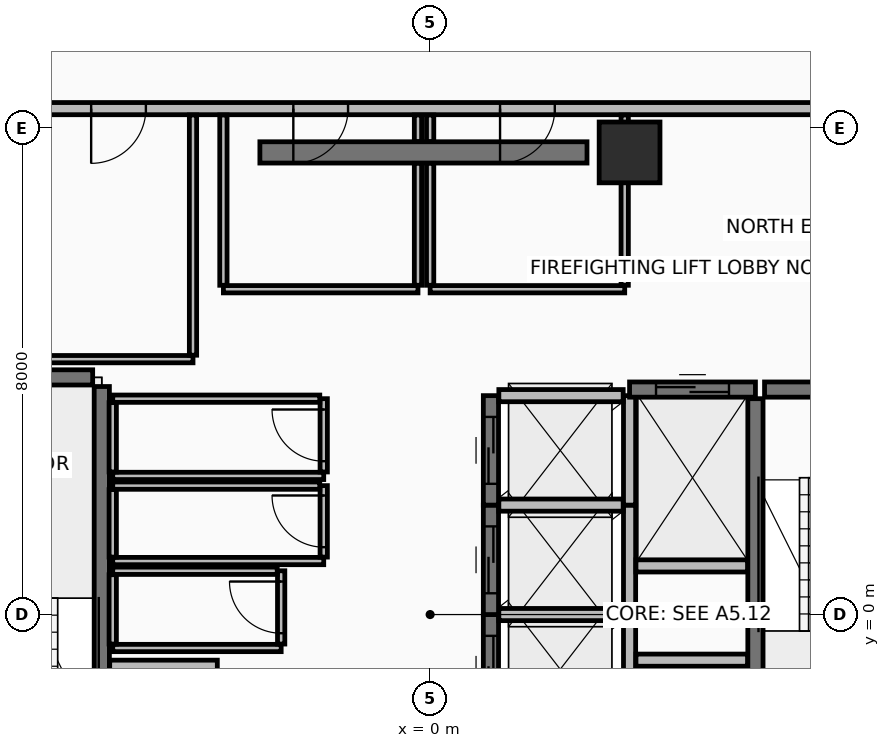
"""IFC4 building model, lengths in metres.
Left out: names, types, materials, properties, quantities, classifications, styles, units other than length and angle.
Written with IfcOpenShell. Run it as: python <this file> out.ifc"""

import sys

from ifc_helpers import new_model, si_unit, direction, frame, frame_2d, origin, origin_2d, place, context, subcontext, project, spatial, rectangle, extrude, element, fill, save


model = new_model("IFC4")
c1 = context("Model", 3, precision=1e-05, world=origin(), true_north=direction((0.0, 1.0)))
c2 = subcontext(c1, "Body", "Model", "MODEL_VIEW")
j1 = project(units=[si_unit("LENGTHUNIT", "METRE"), si_unit("PLANEANGLEUNIT", "RADIAN")], contexts=[c1])
p1 = place(None, origin())
s1 = spatial("IfcSite", under=j1, at=p1, CompositionType="ELEMENT")
p2 = place(p1, origin())
s2 = spatial("IfcBuilding", under=s1, at=p2, CompositionType="ELEMENT")
p3 = place(p2, frame((0.0, 0.0, 264.2)))
s3 = spatial("IfcBuildingStorey", under=s2, at=p3, CompositionType="ELEMENT", Elevation=264.2)
p4 = place(p3, frame((3.28, 7.6, 0.0), z_axis=(0.0, 0.0, 1.0), x_axis=(1.0, 0.0, 0.0)))
e1 = element("IfcColumn", 1, at=p4, inside=s3, PredefinedType="COLUMN", context=c2, shape_type="SweptSolid", body=[
    extrude(rectangle(XDim=1.0, YDim=1.0, at=origin_2d()), origin(), (0.0, 0.0, 1.0), 3.6),
])
p5 = place(p3, frame((-2.8, 7.6, 0.0), z_axis=(0.0, 0.0, 1.0), x_axis=(1.0, 0.0, 0.0)))
e2 = element("IfcWall", 2, at=p5, inside=s3, PredefinedType="SHEAR", context=c2, shape_type="SweptSolid", body=[
    extrude(rectangle(XDim=5.38, YDim=0.35, at=frame_2d((2.69, 0.0))), origin(), (0.0, 0.0, 1.0), 3.42),
])
p6 = place(p3, frame((9.62, 8.32, 0.0), z_axis=(0.0, 0.0, 1.0), x_axis=(-1.0, 0.0, 0.0)))
e3 = element("IfcWall", 3, at=p6, inside=s3, PredefinedType="PARTITIONING", context=c2, shape_type="SweptSolid", body=[
    extrude(rectangle(XDim=19.24, YDim=0.2, at=frame_2d((9.62, 0.0))), origin(), (0.0, 0.0, 1.0), 2.915),
])
p7 = place(p6, frame((10.97, 0.0, 0.0)))
e4 = element("IfcOpeningElement", 4, at=p7, cuts=e3, PredefinedType="OPENING", context=c2, shape_type="SweptSolid", body=[
    extrude(rectangle(XDim=0.9, YDim=2.1, at=frame_2d((0.45, 1.05))), frame((0.0, 0.11, 0.0), z_axis=(0.0, -1.0, 0.0), x_axis=(1.0, 0.0, 0.0)), (0.0, 0.0, 1.0), 0.22),
])
p8 = place(p6, frame((7.57, 0.0, 0.0)))
e5 = element("IfcOpeningElement", 5, at=p8, cuts=e3, PredefinedType="OPENING", context=c2, shape_type="SweptSolid", body=[
    extrude(rectangle(XDim=0.9, YDim=2.1, at=frame_2d((0.45, 1.05))), frame((0.0, 0.11, 0.0), z_axis=(0.0, -1.0, 0.0), x_axis=(1.0, 0.0, 0.0)), (0.0, 0.0, 1.0), 0.22),
])
p9 = place(p6, frame((16.245, 0.0, 0.0)))
e6 = element("IfcOpeningElement", 6, at=p9, cuts=e3, PredefinedType="OPENING", context=c2, shape_type="SweptSolid", body=[
    extrude(rectangle(XDim=0.9, YDim=2.1, at=frame_2d((0.45, 1.05))), frame((0.0, 0.11, 0.0), z_axis=(0.0, -1.0, 0.0), x_axis=(1.0, 0.0, 0.0)), (0.0, 0.0, 1.0), 0.22),
])
p10 = place(p6, frame((14.295, 0.0, 0.0)))
e7 = element("IfcOpeningElement", 7, at=p10, cuts=e3, PredefinedType="OPENING", context=c2, shape_type="SweptSolid", body=[
    extrude(rectangle(XDim=0.9, YDim=2.1, at=frame_2d((0.45, 1.05))), frame((0.0, 0.11, 0.0), z_axis=(0.0, -1.0, 0.0), x_axis=(1.0, 0.0, 0.0)), (0.0, 0.0, 1.0), 0.22),
])
p11 = place(p3, frame((-5.4, -3.55, 0.0), z_axis=(0.0, 0.0, 1.0), x_axis=(0.0, 1.0, 0.0)))
e8 = element("IfcWall", 8, at=p11, inside=s3, PredefinedType="SHEAR", context=c2, shape_type="SweptSolid", body=[
    extrude(rectangle(XDim=7.3, YDim=0.25, at=frame_2d((3.65, 0.0))), origin(), (0.0, 0.0, 1.0), 3.42),
])
p12 = place(p3, frame((-8.5, 3.9, 0.0), z_axis=(0.0, 0.0, 1.0), x_axis=(1.0, 0.0, 0.0)))
e9 = element("IfcWall", 9, at=p12, inside=s3, PredefinedType="SHEAR", context=c2, shape_type="SweptSolid", body=[
    extrude(rectangle(XDim=2.95, YDim=0.25, at=frame_2d((1.475, 0.0))), origin(), (0.0, 0.0, 1.0), 3.42),
])
p13 = place(p3, frame((5.35, -3.75, 0.0), z_axis=(0.0, 0.0, 1.0), x_axis=(0.0, 1.0, 0.0)))
e10 = element("IfcWall", 10, at=p13, inside=s3, PredefinedType="SHEAR", context=c2, shape_type="SweptSolid", body=[
    extrude(rectangle(XDim=7.3, YDim=0.25, at=frame_2d((3.65, 0.0))), origin(), (0.0, 0.0, 1.0), 3.42),
])
p14 = place(p3, frame((5.5, 3.7, 0.0), z_axis=(0.0, 0.0, 1.0), x_axis=(1.0, 0.0, 0.0)))
e11 = element("IfcWall", 11, at=p14, inside=s3, PredefinedType="SHEAR", context=c2, shape_type="SweptSolid", body=[
    extrude(rectangle(XDim=3.0, YDim=0.25, at=frame_2d((1.5, 0.0))), origin(), (0.0, 0.0, 1.0), 3.42),
])
p15 = place(p14, frame((0.95, 0.0, 0.0)))
e12 = element("IfcOpeningElement", 12, at=p15, cuts=e11, PredefinedType="OPENING", context=c2, shape_type="SweptSolid", body=[
    extrude(rectangle(XDim=1.1, YDim=2.15, at=frame_2d((0.55, 1.075))), frame((0.0, 0.135, 0.0), z_axis=(0.0, -1.0, 0.0), x_axis=(1.0, 0.0, 0.0)), (0.0, 0.0, 1.0), 0.27),
])
p16 = place(p3, frame((1.0, -1.8, 0.0), z_axis=(0.0, 0.0, 1.0), x_axis=(0.0, 1.0, 0.0)))
e13 = element("IfcWall", 13, at=p16, inside=s3, PredefinedType="SHEAR", context=c2, shape_type="SweptSolid", body=[
    extrude(rectangle(XDim=1.8, YDim=0.25, at=frame_2d((0.9, 0.0))), origin(), (0.0, 0.0, 1.0), 3.42),
])
p17 = place(p16, frame((0.35, 0.0, 0.0)))
e14 = element("IfcOpeningElement", 14, at=p17, cuts=e13, PredefinedType="OPENING", context=c2, shape_type="SweptSolid", body=[
    extrude(rectangle(XDim=1.1, YDim=2.2, at=frame_2d((0.55, 1.1))), frame((0.0, 0.135, 0.0), z_axis=(0.0, -1.0, 0.0), x_axis=(1.0, 0.0, 0.0)), (0.0, 0.0, 1.0), 0.27),
])
p18 = place(p3, frame((3.28, -1.8, 0.0), z_axis=(0.0, 0.0, 1.0), x_axis=(0.0, 1.0, 0.0)))
e15 = element("IfcWall", 15, at=p18, inside=s3, PredefinedType="PARTITIONING", context=c2, shape_type="SweptSolid", body=[
    extrude(rectangle(XDim=1.8, YDim=0.2, at=frame_2d((0.9, 0.0))), origin(), (0.0, 0.0, 1.0), 3.42),
])
p19 = place(p3, frame((1.13, 0.0, 0.0), z_axis=(0.0, 0.0, 1.0), x_axis=(1.0, 0.0, 0.0)))
e16 = element("IfcWall", 16, at=p19, inside=s3, PredefinedType="PARTITIONING", context=c2, shape_type="SweptSolid", body=[
    extrude(rectangle(XDim=2.045, YDim=0.2, at=frame_2d((1.022, 0.0))), origin(), (0.0, 0.0, 1.0), 3.42),
])
p20 = place(p3, frame((1.0, 0.0, 0.0), z_axis=(0.0, 0.0, 1.0), x_axis=(0.0, 1.0, 0.0)))
e17 = element("IfcWall", 17, at=p20, inside=s3, PredefinedType="SHEAR", context=c2, shape_type="SweptSolid", body=[
    extrude(rectangle(XDim=1.8, YDim=0.25, at=frame_2d((0.9, 0.0))), origin(), (0.0, 0.0, 1.0), 3.42),
])
p21 = place(p20, frame((0.35, 0.0, 0.0)))
e18 = element("IfcOpeningElement", 18, at=p21, cuts=e17, PredefinedType="OPENING", context=c2, shape_type="SweptSolid", body=[
    extrude(rectangle(XDim=1.1, YDim=2.2, at=frame_2d((0.55, 1.1))), frame((0.0, 0.135, 0.0), z_axis=(0.0, -1.0, 0.0), x_axis=(1.0, 0.0, 0.0)), (0.0, 0.0, 1.0), 0.27),
])
p22 = place(p3, frame((3.28, 0.0, 0.0), z_axis=(0.0, 0.0, 1.0), x_axis=(0.0, 1.0, 0.0)))
e19 = element("IfcWall", 19, at=p22, inside=s3, PredefinedType="PARTITIONING", context=c2, shape_type="SweptSolid", body=[
    extrude(rectangle(XDim=1.8, YDim=0.2, at=frame_2d((0.9, 0.0))), origin(), (0.0, 0.0, 1.0), 3.42),
])
p23 = place(p3, frame((1.13, 1.8, 0.0), z_axis=(0.0, 0.0, 1.0), x_axis=(1.0, 0.0, 0.0)))
e20 = element("IfcWall", 20, at=p23, inside=s3, PredefinedType="PARTITIONING", context=c2, shape_type="SweptSolid", body=[
    extrude(rectangle(XDim=2.045, YDim=0.2, at=frame_2d((1.022, 0.0))), origin(), (0.0, 0.0, 1.0), 3.42),
])
p24 = place(p3, frame((1.0, 1.8, 0.0), z_axis=(0.0, 0.0, 1.0), x_axis=(0.0, 1.0, 0.0)))
e21 = element("IfcWall", 21, at=p24, inside=s3, PredefinedType="SHEAR", context=c2, shape_type="SweptSolid", body=[
    extrude(rectangle(XDim=1.8, YDim=0.25, at=frame_2d((0.9, 0.0))), origin(), (0.0, 0.0, 1.0), 3.42),
])
p25 = place(p24, frame((0.35, 0.0, 0.0)))
e22 = element("IfcOpeningElement", 22, at=p25, cuts=e21, PredefinedType="OPENING", context=c2, shape_type="SweptSolid", body=[
    extrude(rectangle(XDim=1.1, YDim=2.2, at=frame_2d((0.55, 1.1))), frame((0.0, 0.135, 0.0), z_axis=(0.0, -1.0, 0.0), x_axis=(1.0, 0.0, 0.0)), (0.0, 0.0, 1.0), 0.27),
])
p26 = place(p3, frame((3.28, 1.8, 0.0), z_axis=(0.0, 0.0, 1.0), x_axis=(0.0, 1.0, 0.0)))
e23 = element("IfcWall", 23, at=p26, inside=s3, PredefinedType="PARTITIONING", context=c2, shape_type="SweptSolid", body=[
    extrude(rectangle(XDim=1.8, YDim=0.2, at=frame_2d((0.9, 0.0))), origin(), (0.0, 0.0, 1.0), 3.42),
])
p27 = place(p3, frame((1.13, 3.6, 0.0), z_axis=(0.0, 0.0, 1.0), x_axis=(1.0, 0.0, 0.0)))
e24 = element("IfcWall", 24, at=p27, inside=s3, PredefinedType="PARTITIONING", context=c2, shape_type="SweptSolid", body=[
    extrude(rectangle(XDim=2.045, YDim=0.2, at=frame_2d((1.022, 0.0))), origin(), (0.0, 0.0, 1.0), 2.715),
])
p28 = place(p3, frame((-5.27, -0.85, 0.0), z_axis=(0.0, 0.0, 1.0), x_axis=(1.0, 0.0, 0.0)))
e25 = element("IfcWall", 25, at=p28, inside=s3, PredefinedType="PARTITIONING", context=c2, shape_type="SweptSolid", body=[
    extrude(rectangle(XDim=1.77, YDim=0.2, at=frame_2d((0.885, 0.0))), origin(), (0.0, 0.0, 1.0), 3.42),
])
p29 = place(p3, frame((3.28, 3.7, 0.0), z_axis=(0.0, 0.0, 1.0), x_axis=(1.0, 0.0, 0.0)))
e26 = element("IfcWall", 26, at=p29, inside=s3, PredefinedType="SHEAR", context=c2, shape_type="SweptSolid", body=[
    extrude(rectangle(XDim=2.07, YDim=0.25, at=frame_2d((1.035, 0.0))), origin(), (0.0, 0.0, 1.0), 3.42),
])
p30 = place(p29, frame((0.435, 0.0, 0.0)))
e27 = element("IfcOpeningElement", 27, at=p30, cuts=e26, PredefinedType="OPENING", context=c2, shape_type="SweptSolid", body=[
    extrude(rectangle(XDim=1.2, YDim=2.2, at=frame_2d((0.6, 1.1))), frame((0.0, 0.135, 0.0), z_axis=(0.0, -1.0, 0.0), x_axis=(1.0, 0.0, 0.0)), (0.0, 0.0, 1.0), 0.27),
])
for number, where, z_axis, x_axis in (
    (28, (3.385, 0.8, 0.0), (0.0, 0.0, 1.0), (1.0, 0.0, 0.0)),
    (29, (3.385, -0.75, 0.0), (0.0, 0.0, 1.0), (1.0, 0.0, 0.0)),
):
    element("IfcWall", number, at=place(p3, frame(where, z_axis=z_axis, x_axis=x_axis)), inside=s3, PredefinedType="PARTITIONING", context=c2, shape_type="SweptSolid", body=[
        extrude(rectangle(XDim=1.835, YDim=0.2, at=frame_2d((0.917, 0.0))), origin(), (0.0, 0.0, 1.0), 3.42),
    ])
p31 = place(p3, frame((-5.22, 2.28, 0.0), z_axis=(0.0, 0.0, 1.0), x_axis=(1.0, 0.0, 0.0)))
e30 = element("IfcWall", 30, at=p31, inside=s3, PredefinedType="PARTITIONING", context=c2, shape_type="SweptSolid", body=[
    extrude(rectangle(XDim=3.47, YDim=0.12, at=frame_2d((1.735, 0.0))), origin(), (0.0, 0.0, 1.0), 3.42),
])
p32 = place(p3, frame((-1.75, 2.345, 0.0), z_axis=(0.0, 0.0, 1.0), x_axis=(0.0, 1.0, 0.0)))
e31 = element("IfcWall", 31, at=p32, inside=s3, PredefinedType="PARTITIONING", context=c2, shape_type="SweptSolid", body=[
    extrude(rectangle(XDim=1.205, YDim=0.12, at=frame_2d((0.603, 0.0))), origin(), (0.0, 0.0, 1.0), 3.42),
])
p33 = place(p32, frame((0.177, 0.0, 0.0)))
e32 = element("IfcOpeningElement", 32, at=p33, cuts=e31, PredefinedType="OPENING", context=c2, shape_type="SweptSolid", body=[
    extrude(rectangle(XDim=0.85, YDim=2.1, at=frame_2d((0.425, 1.05))), frame((0.0, 0.07, 0.0), z_axis=(0.0, -1.0, 0.0), x_axis=(1.0, 0.0, 0.0)), (0.0, 0.0, 1.0), 0.14),
])
p34 = place(p3, frame((-1.815, 3.55, 0.0), z_axis=(0.0, 0.0, 1.0), x_axis=(-1.0, 0.0, 0.0)))
e33 = element("IfcWall", 33, at=p34, inside=s3, PredefinedType="PARTITIONING", context=c2, shape_type="SweptSolid", body=[
    extrude(rectangle(XDim=3.405, YDim=0.12, at=frame_2d((1.703, 0.0))), origin(), (0.0, 0.0, 1.0), 3.42),
])
p35 = place(p3, frame((-5.22, 3.485, 0.0), z_axis=(0.0, 0.0, 1.0), x_axis=(0.0, -1.0, 0.0)))
e34 = element("IfcWall", 34, at=p35, inside=s3, PredefinedType="PARTITIONING", context=c2, shape_type="SweptSolid", body=[
    extrude(rectangle(XDim=1.14, YDim=0.12, at=frame_2d((0.57, 0.0))), origin(), (0.0, 0.0, 1.0), 3.42),
])
p36 = place(p3, frame((-5.22, 0.88, 0.0), z_axis=(0.0, 0.0, 1.0), x_axis=(1.0, 0.0, 0.0)))
e35 = element("IfcWall", 35, at=p36, inside=s3, PredefinedType="PARTITIONING", context=c2, shape_type="SweptSolid", body=[
    extrude(rectangle(XDim=3.47, YDim=0.12, at=frame_2d((1.735, 0.0))), origin(), (0.0, 0.0, 1.0), 3.42),
])
p37 = place(p3, frame((-1.75, 0.945, 0.0), z_axis=(0.0, 0.0, 1.0), x_axis=(0.0, 1.0, 0.0)))
e36 = element("IfcWall", 36, at=p37, inside=s3, PredefinedType="PARTITIONING", context=c2, shape_type="SweptSolid", body=[
    extrude(rectangle(XDim=1.175, YDim=0.12, at=frame_2d((0.587, 0.0))), origin(), (0.0, 0.0, 1.0), 3.42),
])
p38 = place(p37, frame((0.163, 0.0, 0.0)))
e37 = element("IfcOpeningElement", 37, at=p38, cuts=e36, PredefinedType="OPENING", context=c2, shape_type="SweptSolid", body=[
    extrude(rectangle(XDim=0.85, YDim=2.1, at=frame_2d((0.425, 1.05))), frame((0.0, 0.07, 0.0), z_axis=(0.0, -1.0, 0.0), x_axis=(1.0, 0.0, 0.0)), (0.0, 0.0, 1.0), 0.14),
])
p39 = place(p3, frame((-1.815, 2.12, 0.0), z_axis=(0.0, 0.0, 1.0), x_axis=(-1.0, 0.0, 0.0)))
e38 = element("IfcWall", 38, at=p39, inside=s3, PredefinedType="PARTITIONING", context=c2, shape_type="SweptSolid", body=[
    extrude(rectangle(XDim=3.405, YDim=0.12, at=frame_2d((1.703, 0.0))), origin(), (0.0, 0.0, 1.0), 3.42),
])
p40 = place(p3, frame((-5.22, 2.055, 0.0), z_axis=(0.0, 0.0, 1.0), x_axis=(0.0, -1.0, 0.0)))
e39 = element("IfcWall", 39, at=p40, inside=s3, PredefinedType="PARTITIONING", context=c2, shape_type="SweptSolid", body=[
    extrude(rectangle(XDim=1.11, YDim=0.12, at=frame_2d((0.555, 0.0))), origin(), (0.0, 0.0, 1.0), 3.42),
])
p41 = place(p3, frame((-5.22, -0.55, 0.0), z_axis=(0.0, 0.0, 1.0), x_axis=(1.0, 0.0, 0.0)))
e40 = element("IfcWall", 40, at=p41, inside=s3, PredefinedType="PARTITIONING", context=c2, shape_type="SweptSolid", body=[
    extrude(rectangle(XDim=2.77, YDim=0.12, at=frame_2d((1.385, 0.0))), origin(), (0.0, 0.0, 1.0), 3.42),
])
p42 = place(p3, frame((-2.45, -0.485, 0.0), z_axis=(0.0, 0.0, 1.0), x_axis=(0.0, 1.0, 0.0)))
e41 = element("IfcWall", 41, at=p42, inside=s3, PredefinedType="PARTITIONING", context=c2, shape_type="SweptSolid", body=[
    extrude(rectangle(XDim=1.205, YDim=0.12, at=frame_2d((0.603, 0.0))), origin(), (0.0, 0.0, 1.0), 3.42),
])
p43 = place(p42, frame((0.178, 0.0, 0.0)))
e42 = element("IfcOpeningElement", 42, at=p43, cuts=e41, PredefinedType="OPENING", context=c2, shape_type="SweptSolid", body=[
    extrude(rectangle(XDim=0.85, YDim=2.1, at=frame_2d((0.425, 1.05))), frame((0.0, 0.07, 0.0), z_axis=(0.0, -1.0, 0.0), x_axis=(1.0, 0.0, 0.0)), (0.0, 0.0, 1.0), 0.14),
])
p44 = place(p3, frame((-2.515, 0.72, 0.0), z_axis=(0.0, 0.0, 1.0), x_axis=(-1.0, 0.0, 0.0)))
e43 = element("IfcWall", 43, at=p44, inside=s3, PredefinedType="PARTITIONING", context=c2, shape_type="SweptSolid", body=[
    extrude(rectangle(XDim=2.705, YDim=0.12, at=frame_2d((1.353, 0.0))), origin(), (0.0, 0.0, 1.0), 3.42),
])
p45 = place(p3, frame((-5.22, 0.655, 0.0), z_axis=(0.0, 0.0, 1.0), x_axis=(0.0, -1.0, 0.0)))
e44 = element("IfcWall", 44, at=p45, inside=s3, PredefinedType="PARTITIONING", context=c2, shape_type="SweptSolid", body=[
    extrude(rectangle(XDim=1.14, YDim=0.12, at=frame_2d((0.57, 0.0))), origin(), (0.0, 0.0, 1.0), 3.42),
])
p46 = place(p3, frame((-3.4, 5.35, 0.0), z_axis=(0.0, 0.0, 1.0), x_axis=(1.0, 0.0, 0.0)))
e45 = element("IfcWall", 45, at=p46, inside=s3, PredefinedType="PARTITIONING", context=c2, shape_type="SweptSolid", body=[
    extrude(rectangle(XDim=3.2, YDim=0.12, at=frame_2d((1.6, 0.0))), origin(), (0.0, 0.0, 1.0), 3.42),
])
p47 = place(p3, frame((-0.2, 5.415, 0.0), z_axis=(0.0, 0.0, 1.0), x_axis=(0.0, 1.0, 0.0)))
e46 = element("IfcWall", 46, at=p47, inside=s3, PredefinedType="PARTITIONING", context=c2, shape_type="SweptSolid", body=[
    extrude(rectangle(XDim=2.005, YDim=0.12, at=frame_2d((1.002, 0.0))), origin(), (0.0, 0.0, 1.0), 2.715),
])
p48 = place(p3, frame((-0.2, 7.78, 0.0), z_axis=(0.0, 0.0, 1.0), x_axis=(0.0, 1.0, 0.0)))
e47 = element("IfcWall", 47, at=p48, inside=s3, PredefinedType="PARTITIONING", context=c2, shape_type="SweptSolid", body=[
    extrude(rectangle(XDim=0.435, YDim=0.12, at=frame_2d((0.218, 0.0))), origin(), (0.0, 0.0, 1.0), 2.715),
])
p49 = place(p3, frame((-3.4, 8.215, 0.0), z_axis=(0.0, 0.0, 1.0), x_axis=(0.0, -1.0, 0.0)))
e48 = element("IfcWall", 48, at=p49, inside=s3, PredefinedType="PARTITIONING", context=c2, shape_type="SweptSolid", body=[
    extrude(rectangle(XDim=2.8, YDim=0.12, at=frame_2d((1.4, 0.0))), origin(), (0.0, 0.0, 1.0), 2.715),
])
p50 = place(p3, frame((0.0, 5.35, 0.0), z_axis=(0.0, 0.0, 1.0), x_axis=(1.0, 0.0, 0.0)))
e49 = element("IfcWall", 49, at=p50, inside=s3, PredefinedType="PARTITIONING", context=c2, shape_type="SweptSolid", body=[
    extrude(rectangle(XDim=3.2, YDim=0.12, at=frame_2d((1.6, 0.0))), origin(), (0.0, 0.0, 1.0), 2.715),
])
p51 = place(p3, frame((3.2, 5.415, 0.0), z_axis=(0.0, 0.0, 1.0), x_axis=(0.0, 1.0, 0.0)))
e50 = element("IfcWall", 50, at=p51, inside=s3, PredefinedType="PARTITIONING", context=c2, shape_type="SweptSolid", body=[
    extrude(rectangle(XDim=2.8, YDim=0.12, at=frame_2d((1.4, 0.0))), origin(), (0.0, 0.0, 1.0), 2.715),
])
p52 = place(p3, frame((0.0, 8.215, 0.0), z_axis=(0.0, 0.0, 1.0), x_axis=(0.0, -1.0, 0.0)))
e51 = element("IfcWall", 51, at=p52, inside=s3, PredefinedType="PARTITIONING", context=c2, shape_type="SweptSolid", body=[
    extrude(rectangle(XDim=0.435, YDim=0.12, at=frame_2d((0.218, 0.0))), origin(), (0.0, 0.0, 1.0), 2.715),
])
p53 = place(p3, frame((0.0, 7.42, 0.0), z_axis=(0.0, 0.0, 1.0), x_axis=(0.0, -1.0, 0.0)))
e52 = element("IfcWall", 52, at=p53, inside=s3, PredefinedType="PARTITIONING", context=c2, shape_type="SweptSolid", body=[
    extrude(rectangle(XDim=2.005, YDim=0.12, at=frame_2d((1.002, 0.0))), origin(), (0.0, 0.0, 1.0), 2.715),
])
p54 = place(p3, frame((-6.35, 4.2, 0.0), z_axis=(0.0, 0.0, 1.0), x_axis=(1.0, 0.0, 0.0)))
e53 = element("IfcWall", 53, at=p54, inside=s3, PredefinedType="PARTITIONING", context=c2, shape_type="SweptSolid", body=[
    extrude(rectangle(XDim=2.45, YDim=0.12, at=frame_2d((1.225, 0.0))), origin(), (0.0, 0.0, 1.0), 3.42),
])
p55 = place(p3, frame((-3.9, 4.265, 0.0), z_axis=(0.0, 0.0, 1.0), x_axis=(0.0, 1.0, 0.0)))
e54 = element("IfcWall", 54, at=p55, inside=s3, PredefinedType="PARTITIONING", context=c2, shape_type="SweptSolid", body=[
    extrude(rectangle(XDim=3.95, YDim=0.12, at=frame_2d((1.975, 0.0))), origin(), (0.0, 0.0, 1.0), 2.715),
])
p56 = place(p17, origin())
e55 = element("IfcDoor", 55, at=p56, inside=s3, OperationType="SLIDING_TO_LEFT", PredefinedType="DOOR", context=c2, shape_type="SweptSolid", body=[
    extrude(rectangle(XDim=1.1, YDim=2.2, at=frame_2d((0.55, 1.1))), frame((0.0, 0.025, 0.0), z_axis=(0.0, -1.0, 0.0), x_axis=(1.0, 0.0, 0.0)), (0.0, 0.0, 1.0), 0.05),
])
fill(e14, e55)
p57 = place(p21, origin())
e56 = element("IfcDoor", 56, at=p57, inside=s3, OperationType="SLIDING_TO_LEFT", PredefinedType="DOOR", context=c2, shape_type="SweptSolid", body=[
    extrude(rectangle(XDim=1.1, YDim=2.2, at=frame_2d((0.55, 1.1))), frame((0.0, 0.025, 0.0), z_axis=(0.0, -1.0, 0.0), x_axis=(1.0, 0.0, 0.0)), (0.0, 0.0, 1.0), 0.05),
])
fill(e18, e56)
p58 = place(p25, origin())
e57 = element("IfcDoor", 57, at=p58, inside=s3, OperationType="SLIDING_TO_LEFT", PredefinedType="DOOR", context=c2, shape_type="SweptSolid", body=[
    extrude(rectangle(XDim=1.1, YDim=2.2, at=frame_2d((0.55, 1.1))), frame((0.0, 0.025, 0.0), z_axis=(0.0, -1.0, 0.0), x_axis=(1.0, 0.0, 0.0)), (0.0, 0.0, 1.0), 0.05),
])
fill(e22, e57)
p59 = place(p30, origin())
e58 = element("IfcDoor", 58, at=p59, inside=s3, OperationType="SLIDING_TO_RIGHT", PredefinedType="DOOR", context=c2, shape_type="SweptSolid", body=[
    extrude(rectangle(XDim=1.2, YDim=2.2, at=frame_2d((0.6, 1.1))), frame((0.0, 0.025, 0.0), z_axis=(0.0, -1.0, 0.0), x_axis=(1.0, 0.0, 0.0)), (0.0, 0.0, 1.0), 0.05),
])
fill(e27, e58)
p60 = place(p33, frame((0.85, 0.0, 0.0), z_axis=(0.0, 0.0, 1.0), x_axis=(-1.0, 0.0, 0.0)))
e59 = element("IfcDoor", 59, at=p60, inside=s3, OperationType="SINGLE_SWING_RIGHT", PredefinedType="DOOR", context=c2, shape_type="SweptSolid", body=[
    extrude(rectangle(XDim=0.85, YDim=2.1, at=frame_2d((0.425, 1.05))), frame((0.0, 0.025, 0.0), z_axis=(0.0, -1.0, 0.0), x_axis=(1.0, 0.0, 0.0)), (0.0, 0.0, 1.0), 0.05),
])
fill(e32, e59)
p61 = place(p38, frame((0.85, 0.0, 0.0), z_axis=(0.0, 0.0, 1.0), x_axis=(-1.0, 0.0, 0.0)))
e60 = element("IfcDoor", 60, at=p61, inside=s3, OperationType="SINGLE_SWING_RIGHT", PredefinedType="DOOR", context=c2, shape_type="SweptSolid", body=[
    extrude(rectangle(XDim=0.85, YDim=2.1, at=frame_2d((0.425, 1.05))), frame((0.0, 0.025, 0.0), z_axis=(0.0, -1.0, 0.0), x_axis=(1.0, 0.0, 0.0)), (0.0, 0.0, 1.0), 0.05),
])
fill(e37, e60)
p62 = place(p43, frame((0.85, 0.0, 0.0), z_axis=(0.0, 0.0, 1.0), x_axis=(-1.0, 0.0, 0.0)))
e61 = element("IfcDoor", 61, at=p62, inside=s3, OperationType="SINGLE_SWING_RIGHT", PredefinedType="DOOR", context=c2, shape_type="SweptSolid", body=[
    extrude(rectangle(XDim=0.85, YDim=2.1, at=frame_2d((0.425, 1.05))), frame((0.0, 0.025, 0.0), z_axis=(0.0, -1.0, 0.0), x_axis=(1.0, 0.0, 0.0)), (0.0, 0.0, 1.0), 0.05),
])
fill(e42, e61)
p63 = place(p7, frame((0.9, 0.0, 0.0), z_axis=(0.0, 0.0, 1.0), x_axis=(-1.0, 0.0, 0.0)))
e62 = element("IfcDoor", 62, at=p63, inside=s3, OperationType="SINGLE_SWING_LEFT", PredefinedType="DOOR", context=c2, shape_type="SweptSolid", body=[
    extrude(rectangle(XDim=0.9, YDim=2.1, at=frame_2d((0.45, 1.05))), frame((0.0, 0.025, 0.0), z_axis=(0.0, -1.0, 0.0), x_axis=(1.0, 0.0, 0.0)), (0.0, 0.0, 1.0), 0.05),
])
fill(e4, e62)
p64 = place(p8, frame((0.9, 0.0, 0.0), z_axis=(0.0, 0.0, 1.0), x_axis=(-1.0, 0.0, 0.0)))
e63 = element("IfcDoor", 63, at=p64, inside=s3, OperationType="SINGLE_SWING_LEFT", PredefinedType="DOOR", context=c2, shape_type="SweptSolid", body=[
    extrude(rectangle(XDim=0.9, YDim=2.1, at=frame_2d((0.45, 1.05))), frame((0.0, 0.025, 0.0), z_axis=(0.0, -1.0, 0.0), x_axis=(1.0, 0.0, 0.0)), (0.0, 0.0, 1.0), 0.05),
])
fill(e5, e63)
p65 = place(p10, frame((0.9, 0.0, 0.0), z_axis=(0.0, 0.0, 1.0), x_axis=(-1.0, 0.0, 0.0)))
e64 = element("IfcDoor", 64, at=p65, inside=s3, OperationType="SINGLE_SWING_LEFT", PredefinedType="DOOR", context=c2, shape_type="SweptSolid", body=[
    extrude(rectangle(XDim=0.9, YDim=2.1, at=frame_2d((0.45, 1.05))), frame((0.0, 0.025, 0.0), z_axis=(0.0, -1.0, 0.0), x_axis=(1.0, 0.0, 0.0)), (0.0, 0.0, 1.0), 0.05),
])
fill(e7, e64)
save(model, sys.argv[1])
